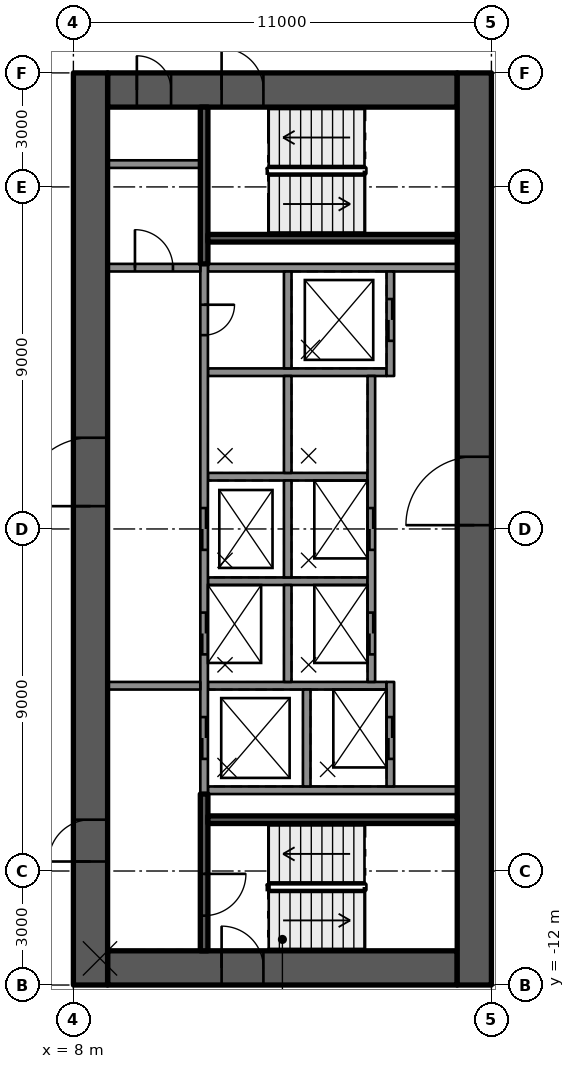
"""IFC4 building model, lengths in metres.
Left out: names, types, materials, properties, quantities, classifications, styles, units other than length and angle.
Written with IfcOpenShell. Run it as: python <this file> out.ifc"""

import sys

from ifc_helpers import new_model, si_unit, direction, frame, frame_2d, origin, place, context, subcontext, project, spatial, rectangle, extrude, element, fill, save


model = new_model("IFC4")
c1 = context("Model", 3, precision=1e-05, world=origin(), true_north=direction((0.0, 1.0)))
c2 = subcontext(c1, "Body", "Model", "MODEL_VIEW")
j1 = project(units=[si_unit("LENGTHUNIT", "METRE"), si_unit("PLANEANGLEUNIT", "RADIAN")], contexts=[c1])
p1 = place(None, origin())
s1 = spatial("IfcSite", under=j1, at=p1, CompositionType="ELEMENT")
p2 = place(p1, origin())
s2 = spatial("IfcBuilding", under=s1, at=p2, CompositionType="ELEMENT")
p3 = place(p2, frame((0.0, 0.0, 116.2)))
s3 = spatial("IfcBuildingStorey", under=s2, at=p3, CompositionType="ELEMENT", Elevation=116.2)
p4 = place(p3, frame((8.9, 11.55, 0.0), z_axis=(0.0, 0.0, 1.0), x_axis=(1.0, 0.0, 0.0)))
e1 = element("IfcWall", 1, at=p4, inside=s3, PredefinedType="SHEAR", context=c2, shape_type="SweptSolid", body=[
    extrude(rectangle(XDim=9.2, YDim=0.9, at=frame_2d((4.6, 0.0))), origin(), (0.0, 0.0, 1.0), 3.5),
])
p5 = place(p4, frame((3.0, 0.0, 0.0)))
e2 = element("IfcOpeningElement", 2, at=p5, cuts=e1, PredefinedType="OPENING", context=c2, shape_type="SweptSolid", body=[
    extrude(rectangle(XDim=1.1, YDim=2.1, at=frame_2d((0.55, 1.05))), frame((0.0, 0.46, 0.0), z_axis=(0.0, -1.0, 0.0), x_axis=(1.0, 0.0, 0.0)), (0.0, 0.0, 1.0), 0.92),
])
p6 = place(p4, frame((0.77, 0.0, 0.0)))
e3 = element("IfcOpeningElement", 3, at=p6, cuts=e1, PredefinedType="OPENING", context=c2, shape_type="SweptSolid", body=[
    extrude(rectangle(XDim=0.9, YDim=2.1, at=frame_2d((0.45, 1.05))), frame((0.0, 0.46, 0.0), z_axis=(0.0, -1.0, 0.0), x_axis=(1.0, 0.0, 0.0)), (0.0, 0.0, 1.0), 0.92),
])
p7 = place(p3, frame((8.9, -11.55, 0.0), z_axis=(0.0, 0.0, 1.0), x_axis=(1.0, 0.0, 0.0)))
e4 = element("IfcWall", 4, at=p7, inside=s3, PredefinedType="SHEAR", context=c2, shape_type="SweptSolid", body=[
    extrude(rectangle(XDim=9.2, YDim=0.9, at=frame_2d((4.6, 0.0))), origin(), (0.0, 0.0, 1.0), 3.5),
])
p8 = place(p7, frame((3.0, 0.0, 0.0)))
e5 = element("IfcOpeningElement", 5, at=p8, cuts=e4, PredefinedType="OPENING", context=c2, shape_type="SweptSolid", body=[
    extrude(rectangle(XDim=1.1, YDim=2.1, at=frame_2d((0.55, 1.05))), frame((0.0, 0.46, 0.0), z_axis=(0.0, -1.0, 0.0), x_axis=(1.0, 0.0, 0.0)), (0.0, 0.0, 1.0), 0.92),
])
p9 = place(p3, frame((8.45, -12.0, 0.0), z_axis=(0.0, 0.0, 1.0), x_axis=(0.0, 1.0, 0.0)))
e6 = element("IfcWall", 6, at=p9, inside=s3, PredefinedType="SHEAR", context=c2, shape_type="SweptSolid", body=[
    extrude(rectangle(XDim=24.0, YDim=0.9, at=frame_2d((12.0, 0.0))), origin(), (0.0, 0.0, 1.0), 3.5),
])
p10 = place(p9, frame((12.6, 0.0, 0.0)))
e7 = element("IfcOpeningElement", 7, at=p10, cuts=e6, PredefinedType="OPENING", context=c2, shape_type="SweptSolid", body=[
    extrude(rectangle(XDim=1.8, YDim=2.1, at=frame_2d((0.9, 1.05))), frame((0.0, 0.46, 0.0), z_axis=(0.0, -1.0, 0.0), x_axis=(1.0, 0.0, 0.0)), (0.0, 0.0, 1.0), 0.92),
])
p11 = place(p9, frame((3.25, 0.0, 0.0)))
e8 = element("IfcOpeningElement", 8, at=p11, cuts=e6, PredefinedType="OPENING", context=c2, shape_type="SweptSolid", body=[
    extrude(rectangle(XDim=1.1, YDim=2.1, at=frame_2d((0.55, 1.05))), frame((0.0, 0.46, 0.0), z_axis=(0.0, -1.0, 0.0), x_axis=(1.0, 0.0, 0.0)), (0.0, 0.0, 1.0), 0.92),
])
p12 = place(p3, frame((18.55, -12.0, 0.0), z_axis=(0.0, 0.0, 1.0), x_axis=(0.0, 1.0, 0.0)))
e9 = element("IfcWall", 9, at=p12, inside=s3, PredefinedType="SHEAR", context=c2, shape_type="SweptSolid", body=[
    extrude(rectangle(XDim=24.0, YDim=0.9, at=frame_2d((12.0, 0.0))), origin(), (0.0, 0.0, 1.0), 3.5),
])
p13 = place(p12, frame((12.1, 0.0, 0.0)))
e10 = element("IfcOpeningElement", 10, at=p13, cuts=e9, PredefinedType="OPENING", context=c2, shape_type="SweptSolid", body=[
    extrude(rectangle(XDim=1.8, YDim=2.1, at=frame_2d((0.9, 1.05))), frame((0.0, 0.46, 0.0), z_axis=(0.0, -1.0, 0.0), x_axis=(1.0, 0.0, 0.0)), (0.0, 0.0, 1.0), 0.92),
])
for number, where, z_axis, x_axis in (
    (11, (11.54, -6.875, 0.0), (0.0, 0.0, 1.0), (1.0, 0.0, 0.0)),
    (12, (11.54, 6.875, 0.0), (0.0, 0.0, 1.0), (1.0, 0.0, 0.0)),
):
    element("IfcWall", number, at=place(p3, frame(where, z_axis=z_axis, x_axis=x_axis)), inside=s3, PredefinedType="SOLIDWALL", context=c2, shape_type="SweptSolid", body=[
        extrude(rectangle(XDim=6.56, YDim=0.2, at=frame_2d((3.28, 0.0))), origin(), (0.0, 0.0, 1.0), 3.09),
    ])
p14 = place(p3, frame((11.54, 4.125, 0.0), z_axis=(0.0, 0.0, 1.0), x_axis=(1.0, 0.0, 0.0)))
e13 = element("IfcWall", 13, at=p14, inside=s3, PredefinedType="SOLIDWALL", context=c2, shape_type="SweptSolid", body=[
    extrude(rectangle(XDim=4.7, YDim=0.2, at=frame_2d((2.35, 0.0))), origin(), (0.0, 0.0, 1.0), 3.09),
])
for number, where, z_axis, x_axis in (
    (14, (11.54, 1.375, 0.0), (0.0, 0.0, 1.0), (1.0, 0.0, 0.0)),
    (15, (11.54, -1.375, 0.0), (0.0, 0.0, 1.0), (1.0, 0.0, 0.0)),
):
    element("IfcWall", number, at=place(p3, frame(where, z_axis=z_axis, x_axis=x_axis)), inside=s3, PredefinedType="SOLIDWALL", context=c2, shape_type="SweptSolid", body=[
        extrude(rectangle(XDim=4.2, YDim=0.2, at=frame_2d((2.1, 0.0))), origin(), (0.0, 0.0, 1.0), 3.09),
    ])
p15 = place(p3, frame((11.54, -4.125, 0.0), z_axis=(0.0, 0.0, 1.0), x_axis=(1.0, 0.0, 0.0)))
e16 = element("IfcWall", 16, at=p15, inside=s3, PredefinedType="SOLIDWALL", context=c2, shape_type="SweptSolid", body=[
    extrude(rectangle(XDim=4.7, YDim=0.2, at=frame_2d((2.35, 0.0))), origin(), (0.0, 0.0, 1.0), 3.09),
])
p16 = place(p3, frame((11.44, 6.975, 0.0), z_axis=(0.0, 0.0, 1.0), x_axis=(0.0, -1.0, 0.0)))
e17 = element("IfcWall", 17, at=p16, inside=s3, PredefinedType="SOLIDWALL", context=c2, shape_type="SweptSolid", body=[
    extrude(rectangle(XDim=13.95, YDim=0.2, at=frame_2d((6.975, 0.0))), origin(), (0.0, 0.0, 1.0), 3.09),
])
p17 = place(p16, frame((6.425, 0.0, 0.0)))
e18 = element("IfcOpeningElement", 18, at=p17, cuts=e17, PredefinedType="OPENING", context=c2, shape_type="SweptSolid", body=[
    extrude(rectangle(XDim=1.1, YDim=2.1, at=frame_2d((0.55, 1.05))), frame((0.0, 0.11, 0.0), z_axis=(0.0, -1.0, 0.0), x_axis=(1.0, 0.0, 0.0)), (0.0, 0.0, 1.0), 0.22),
])
p18 = place(p16, frame((9.175, 0.0, 0.0)))
e19 = element("IfcOpeningElement", 19, at=p18, cuts=e17, PredefinedType="OPENING", context=c2, shape_type="SweptSolid", body=[
    extrude(rectangle(XDim=1.1, YDim=2.1, at=frame_2d((0.55, 1.05))), frame((0.0, 0.11, 0.0), z_axis=(0.0, -1.0, 0.0), x_axis=(1.0, 0.0, 0.0)), (0.0, 0.0, 1.0), 0.22),
])
p19 = place(p16, frame((11.925, 0.0, 0.0)))
e20 = element("IfcOpeningElement", 20, at=p19, cuts=e17, PredefinedType="OPENING", context=c2, shape_type="SweptSolid", body=[
    extrude(rectangle(XDim=1.1, YDim=2.1, at=frame_2d((0.55, 1.05))), frame((0.0, 0.11, 0.0), z_axis=(0.0, -1.0, 0.0), x_axis=(1.0, 0.0, 0.0)), (0.0, 0.0, 1.0), 0.22),
])
p20 = place(p16, frame((1.075, 0.0, 0.0)))
e21 = element("IfcOpeningElement", 21, at=p20, cuts=e17, PredefinedType="OPENING", context=c2, shape_type="SweptSolid", body=[
    extrude(rectangle(XDim=0.8, YDim=2.1, at=frame_2d((0.4, 1.05))), frame((0.0, 0.11, 0.0), z_axis=(0.0, -1.0, 0.0), x_axis=(1.0, 0.0, 0.0)), (0.0, 0.0, 1.0), 0.22),
])
for number, where, z_axis, x_axis in (
    (22, (13.64, 6.775, 0.0), (0.0, 0.0, 1.0), (0.0, -1.0, 0.0)),
    (23, (13.64, 4.025, 0.0), (0.0, 0.0, 1.0), (0.0, -1.0, 0.0)),
    (24, (13.64, 1.275, 0.0), (0.0, 0.0, 1.0), (0.0, -1.0, 0.0)),
    (25, (13.64, -1.475, 0.0), (0.0, 0.0, 1.0), (0.0, -1.0, 0.0)),
    (26, (14.14, -4.225, 0.0), (0.0, 0.0, 1.0), (0.0, -1.0, 0.0)),
):
    element("IfcWall", number, at=place(p3, frame(where, z_axis=z_axis, x_axis=x_axis)), inside=s3, PredefinedType="SOLIDWALL", context=c2, shape_type="SweptSolid", body=[
        extrude(rectangle(XDim=2.55, YDim=0.2, at=frame_2d((1.275, 0.0))), origin(), (0.0, 0.0, 1.0), 3.09),
    ])
p21 = place(p3, frame((16.34, 6.775, 0.0), z_axis=(0.0, 0.0, 1.0), x_axis=(0.0, -1.0, 0.0)))
e27 = element("IfcWall", 27, at=p21, inside=s3, PredefinedType="SOLIDWALL", context=c2, shape_type="SweptSolid", body=[
    extrude(rectangle(XDim=2.75, YDim=0.2, at=frame_2d((1.375, 0.0))), origin(), (0.0, 0.0, 1.0), 3.09),
])
p22 = place(p21, frame((0.725, 0.0, 0.0)))
e28 = element("IfcOpeningElement", 28, at=p22, cuts=e27, PredefinedType="OPENING", context=c2, shape_type="SweptSolid", body=[
    extrude(rectangle(XDim=1.1, YDim=2.1, at=frame_2d((0.55, 1.05))), frame((0.0, 0.11, 0.0), z_axis=(0.0, -1.0, 0.0), x_axis=(1.0, 0.0, 0.0)), (0.0, 0.0, 1.0), 0.22),
])
p23 = place(p3, frame((15.84, 4.025, 0.0), z_axis=(0.0, 0.0, 1.0), x_axis=(0.0, -1.0, 0.0)))
e29 = element("IfcWall", 29, at=p23, inside=s3, PredefinedType="SOLIDWALL", context=c2, shape_type="SweptSolid", body=[
    extrude(rectangle(XDim=8.05, YDim=0.2, at=frame_2d((4.025, 0.0))), origin(), (0.0, 0.0, 1.0), 3.09),
])
p24 = place(p23, frame((3.475, 0.0, 0.0)))
e30 = element("IfcOpeningElement", 30, at=p24, cuts=e29, PredefinedType="OPENING", context=c2, shape_type="SweptSolid", body=[
    extrude(rectangle(XDim=1.1, YDim=2.1, at=frame_2d((0.55, 1.05))), frame((0.0, 0.11, 0.0), z_axis=(0.0, -1.0, 0.0), x_axis=(1.0, 0.0, 0.0)), (0.0, 0.0, 1.0), 0.22),
])
p25 = place(p23, frame((6.225, 0.0, 0.0)))
e31 = element("IfcOpeningElement", 31, at=p25, cuts=e29, PredefinedType="OPENING", context=c2, shape_type="SweptSolid", body=[
    extrude(rectangle(XDim=1.1, YDim=2.1, at=frame_2d((0.55, 1.05))), frame((0.0, 0.11, 0.0), z_axis=(0.0, -1.0, 0.0), x_axis=(1.0, 0.0, 0.0)), (0.0, 0.0, 1.0), 0.22),
])
p26 = place(p3, frame((16.34, -4.025, 0.0), z_axis=(0.0, 0.0, 1.0), x_axis=(0.0, -1.0, 0.0)))
e32 = element("IfcWall", 32, at=p26, inside=s3, PredefinedType="SOLIDWALL", context=c2, shape_type="SweptSolid", body=[
    extrude(rectangle(XDim=2.75, YDim=0.2, at=frame_2d((1.375, 0.0))), origin(), (0.0, 0.0, 1.0), 3.09),
])
p27 = place(p26, frame((0.925, 0.0, 0.0)))
e33 = element("IfcOpeningElement", 33, at=p27, cuts=e32, PredefinedType="OPENING", context=c2, shape_type="SweptSolid", body=[
    extrude(rectangle(XDim=1.1, YDim=2.1, at=frame_2d((0.55, 1.05))), frame((0.0, 0.11, 0.0), z_axis=(0.0, -1.0, 0.0), x_axis=(1.0, 0.0, 0.0)), (0.0, 0.0, 1.0), 0.22),
])
p28 = place(p3, frame((11.44, -6.975, 0.0), z_axis=(0.0, 0.0, 1.0), x_axis=(0.0, -1.0, 0.0)))
e34 = element("IfcWall", 34, at=p28, inside=s3, PredefinedType="SOLIDWALL", context=c2, shape_type="SweptSolid", body=[
    extrude(rectangle(XDim=4.125, YDim=0.2, at=frame_2d((2.062, 0.0))), origin(), (0.0, 0.0, 1.0), 3.09),
])
p29 = place(p28, frame((2.1, 0.0, 0.0)))
e35 = element("IfcOpeningElement", 35, at=p29, cuts=e34, PredefinedType="OPENING", context=c2, shape_type="SweptSolid", body=[
    extrude(rectangle(XDim=1.1, YDim=2.1, at=frame_2d((0.55, 1.05))), frame((0.0, 0.11, 0.0), z_axis=(0.0, -1.0, 0.0), x_axis=(1.0, 0.0, 0.0)), (0.0, 0.0, 1.0), 0.22),
])
p30 = place(p3, frame((11.54, -7.65, 0.0), z_axis=(0.0, 0.0, 1.0), x_axis=(1.0, 0.0, 0.0)))
e36 = element("IfcWall", 36, at=p30, inside=s3, PredefinedType="SOLIDWALL", context=c2, shape_type="SweptSolid", body=[
    extrude(rectangle(XDim=6.56, YDim=0.2, at=frame_2d((3.28, 0.0))), origin(), (0.0, 0.0, 1.0), 3.09),
])
p31 = place(p3, frame((11.44, 11.1, 0.0), z_axis=(0.0, 0.0, 1.0), x_axis=(0.0, -1.0, 0.0)))
e37 = element("IfcWall", 37, at=p31, inside=s3, PredefinedType="SOLIDWALL", context=c2, shape_type="SweptSolid", body=[
    extrude(rectangle(XDim=4.125, YDim=0.2, at=frame_2d((2.062, 0.0))), origin(), (0.0, 0.0, 1.0), 3.09),
])
p32 = place(p3, frame((11.54, 7.65, 0.0), z_axis=(0.0, 0.0, 1.0), x_axis=(1.0, 0.0, 0.0)))
e38 = element("IfcWall", 38, at=p32, inside=s3, PredefinedType="SOLIDWALL", context=c2, shape_type="SweptSolid", body=[
    extrude(rectangle(XDim=6.56, YDim=0.2, at=frame_2d((3.28, 0.0))), origin(), (0.0, 0.0, 1.0), 3.09),
])
p33 = place(p3, frame((8.9, -4.125, 0.0), z_axis=(0.0, 0.0, 1.0), x_axis=(1.0, 0.0, 0.0)))
e39 = element("IfcWall", 39, at=p33, inside=s3, PredefinedType="PARTITIONING", context=c2, shape_type="SweptSolid", body=[
    extrude(rectangle(XDim=2.44, YDim=0.2, at=frame_2d((1.22, 0.0))), origin(), (0.0, 0.0, 1.0), 3.09),
])
p34 = place(p3, frame((8.9, 6.875, 0.0), z_axis=(0.0, 0.0, 1.0), x_axis=(1.0, 0.0, 0.0)))
e40 = element("IfcWall", 40, at=p34, inside=s3, PredefinedType="PARTITIONING", context=c2, shape_type="SweptSolid", body=[
    extrude(rectangle(XDim=2.44, YDim=0.2, at=frame_2d((1.22, 0.0))), origin(), (0.0, 0.0, 1.0), 3.09),
])
p35 = place(p34, frame((0.72, 0.0, 0.0)))
e41 = element("IfcOpeningElement", 41, at=p35, cuts=e40, PredefinedType="OPENING", context=c2, shape_type="SweptSolid", body=[
    extrude(rectangle(XDim=1.0, YDim=2.1, at=frame_2d((0.5, 1.05))), frame((0.0, 0.11, 0.0), z_axis=(0.0, -1.0, 0.0), x_axis=(1.0, 0.0, 0.0)), (0.0, 0.0, 1.0), 0.22),
])
p36 = place(p3, frame((8.9, 9.6, 0.0), z_axis=(0.0, 0.0, 1.0), x_axis=(1.0, 0.0, 0.0)))
e42 = element("IfcWall", 42, at=p36, inside=s3, PredefinedType="PARTITIONING", context=c2, shape_type="SweptSolid", body=[
    extrude(rectangle(XDim=2.44, YDim=0.2, at=frame_2d((1.22, 0.0))), origin(), (0.0, 0.0, 1.0), 3.09),
])
p37 = place(p22, origin())
e43 = element("IfcDoor", 43, at=p37, inside=s3, OperationType="DOUBLE_DOOR_SLIDING", PredefinedType="DOOR", context=c2, shape_type="SweptSolid", body=[
    extrude(rectangle(XDim=1.1, YDim=2.1, at=frame_2d((0.55, 1.05))), frame((0.0, 0.025, 0.0), z_axis=(0.0, -1.0, 0.0), x_axis=(1.0, 0.0, 0.0)), (0.0, 0.0, 1.0), 0.05),
])
fill(e28, e43)
p38 = place(p17, origin())
e44 = element("IfcDoor", 44, at=p38, inside=s3, OperationType="DOUBLE_DOOR_SLIDING", PredefinedType="DOOR", context=c2, shape_type="SweptSolid", body=[
    extrude(rectangle(XDim=1.1, YDim=2.1, at=frame_2d((0.55, 1.05))), frame((0.0, 0.025, 0.0), z_axis=(0.0, -1.0, 0.0), x_axis=(1.0, 0.0, 0.0)), (0.0, 0.0, 1.0), 0.05),
])
fill(e18, e44)
p39 = place(p24, origin())
e45 = element("IfcDoor", 45, at=p39, inside=s3, OperationType="DOUBLE_DOOR_SLIDING", PredefinedType="DOOR", context=c2, shape_type="SweptSolid", body=[
    extrude(rectangle(XDim=1.1, YDim=2.1, at=frame_2d((0.55, 1.05))), frame((0.0, 0.025, 0.0), z_axis=(0.0, -1.0, 0.0), x_axis=(1.0, 0.0, 0.0)), (0.0, 0.0, 1.0), 0.05),
])
fill(e30, e45)
p40 = place(p18, origin())
e46 = element("IfcDoor", 46, at=p40, inside=s3, OperationType="DOUBLE_DOOR_SLIDING", PredefinedType="DOOR", context=c2, shape_type="SweptSolid", body=[
    extrude(rectangle(XDim=1.1, YDim=2.1, at=frame_2d((0.55, 1.05))), frame((0.0, 0.025, 0.0), z_axis=(0.0, -1.0, 0.0), x_axis=(1.0, 0.0, 0.0)), (0.0, 0.0, 1.0), 0.05),
])
fill(e19, e46)
p41 = place(p25, origin())
e47 = element("IfcDoor", 47, at=p41, inside=s3, OperationType="DOUBLE_DOOR_SLIDING", PredefinedType="DOOR", context=c2, shape_type="SweptSolid", body=[
    extrude(rectangle(XDim=1.1, YDim=2.1, at=frame_2d((0.55, 1.05))), frame((0.0, 0.025, 0.0), z_axis=(0.0, -1.0, 0.0), x_axis=(1.0, 0.0, 0.0)), (0.0, 0.0, 1.0), 0.05),
])
fill(e31, e47)
p42 = place(p19, origin())
e48 = element("IfcDoor", 48, at=p42, inside=s3, OperationType="DOUBLE_DOOR_SLIDING", PredefinedType="DOOR", context=c2, shape_type="SweptSolid", body=[
    extrude(rectangle(XDim=1.1, YDim=2.1, at=frame_2d((0.55, 1.05))), frame((0.0, 0.025, 0.0), z_axis=(0.0, -1.0, 0.0), x_axis=(1.0, 0.0, 0.0)), (0.0, 0.0, 1.0), 0.05),
])
fill(e20, e48)
p43 = place(p27, origin())
e49 = element("IfcDoor", 49, at=p43, inside=s3, OperationType="DOUBLE_DOOR_SLIDING", PredefinedType="DOOR", context=c2, shape_type="SweptSolid", body=[
    extrude(rectangle(XDim=1.1, YDim=2.1, at=frame_2d((0.55, 1.05))), frame((0.0, 0.025, 0.0), z_axis=(0.0, -1.0, 0.0), x_axis=(1.0, 0.0, 0.0)), (0.0, 0.0, 1.0), 0.05),
])
fill(e33, e49)
p44 = place(p20, origin())
e50 = element("IfcDoor", 50, at=p44, inside=s3, OperationType="SINGLE_SWING_LEFT", PredefinedType="DOOR", context=c2, shape_type="SweptSolid", body=[
    extrude(rectangle(XDim=0.8, YDim=2.1, at=frame_2d((0.4, 1.05))), frame((0.0, 0.025, 0.0), z_axis=(0.0, -1.0, 0.0), x_axis=(1.0, 0.0, 0.0)), (0.0, 0.0, 1.0), 0.05),
])
fill(e21, e50)
p45 = place(p10, origin())
e51 = element("IfcDoor", 51, at=p45, inside=s3, OperationType="SINGLE_SWING_RIGHT", PredefinedType="DOOR", context=c2, shape_type="SweptSolid", body=[
    extrude(rectangle(XDim=1.8, YDim=2.1, at=frame_2d((0.9, 1.05))), frame((0.0, 0.025, 0.0), z_axis=(0.0, -1.0, 0.0), x_axis=(1.0, 0.0, 0.0)), (0.0, 0.0, 1.0), 0.05),
])
fill(e7, e51)
p46 = place(p13, origin())
e52 = element("IfcDoor", 52, at=p46, inside=s3, OperationType="SINGLE_SWING_RIGHT", PredefinedType="DOOR", context=c2, shape_type="SweptSolid", body=[
    extrude(rectangle(XDim=1.8, YDim=2.1, at=frame_2d((0.9, 1.05))), frame((0.0, 0.025, 0.0), z_axis=(0.0, -1.0, 0.0), x_axis=(1.0, 0.0, 0.0)), (0.0, 0.0, 1.0), 0.05),
])
fill(e10, e52)
p47 = place(p11, origin())
e53 = element("IfcDoor", 53, at=p47, inside=s3, OperationType="SINGLE_SWING_LEFT", PredefinedType="DOOR", context=c2, shape_type="SweptSolid", body=[
    extrude(rectangle(XDim=1.1, YDim=2.1, at=frame_2d((0.55, 1.05))), frame((0.0, 0.025, 0.0), z_axis=(0.0, -1.0, 0.0), x_axis=(1.0, 0.0, 0.0)), (0.0, 0.0, 1.0), 0.05),
])
fill(e8, e53)
p48 = place(p8, origin())
e54 = element("IfcDoor", 54, at=p48, inside=s3, OperationType="SINGLE_SWING_LEFT", PredefinedType="DOOR", context=c2, shape_type="SweptSolid", body=[
    extrude(rectangle(XDim=1.1, YDim=2.1, at=frame_2d((0.55, 1.05))), frame((0.0, 0.025, 0.0), z_axis=(0.0, -1.0, 0.0), x_axis=(1.0, 0.0, 0.0)), (0.0, 0.0, 1.0), 0.05),
])
fill(e5, e54)
p49 = place(p5, origin())
e55 = element("IfcDoor", 55, at=p49, inside=s3, OperationType="SINGLE_SWING_LEFT", PredefinedType="DOOR", context=c2, shape_type="SweptSolid", body=[
    extrude(rectangle(XDim=1.1, YDim=2.1, at=frame_2d((0.55, 1.05))), frame((0.0, 0.025, 0.0), z_axis=(0.0, -1.0, 0.0), x_axis=(1.0, 0.0, 0.0)), (0.0, 0.0, 1.0), 0.05),
])
fill(e2, e55)
p50 = place(p29, origin())
e56 = element("IfcDoor", 56, at=p50, inside=s3, OperationType="SINGLE_SWING_RIGHT", PredefinedType="DOOR", context=c2, shape_type="SweptSolid", body=[
    extrude(rectangle(XDim=1.1, YDim=2.1, at=frame_2d((0.55, 1.05))), frame((0.0, 0.025, 0.0), z_axis=(0.0, -1.0, 0.0), x_axis=(1.0, 0.0, 0.0)), (0.0, 0.0, 1.0), 0.05),
])
fill(e35, e56)
p51 = place(p6, origin())
e57 = element("IfcDoor", 57, at=p51, inside=s3, OperationType="SINGLE_SWING_LEFT", PredefinedType="DOOR", context=c2, shape_type="SweptSolid", body=[
    extrude(rectangle(XDim=0.9, YDim=2.1, at=frame_2d((0.45, 1.05))), frame((0.0, 0.025, 0.0), z_axis=(0.0, -1.0, 0.0), x_axis=(1.0, 0.0, 0.0)), (0.0, 0.0, 1.0), 0.05),
])
fill(e3, e57)
p52 = place(p35, origin())
e58 = element("IfcDoor", 58, at=p52, inside=s3, OperationType="SINGLE_SWING_RIGHT", PredefinedType="DOOR", context=c2, shape_type="SweptSolid", body=[
    extrude(rectangle(XDim=1.0, YDim=2.1, at=frame_2d((0.5, 1.05))), frame((0.0, 0.025, 0.0), z_axis=(0.0, -1.0, 0.0), x_axis=(1.0, 0.0, 0.0)), (0.0, 0.0, 1.0), 0.05),
])
fill(e41, e58)
save(model, sys.argv[1])
